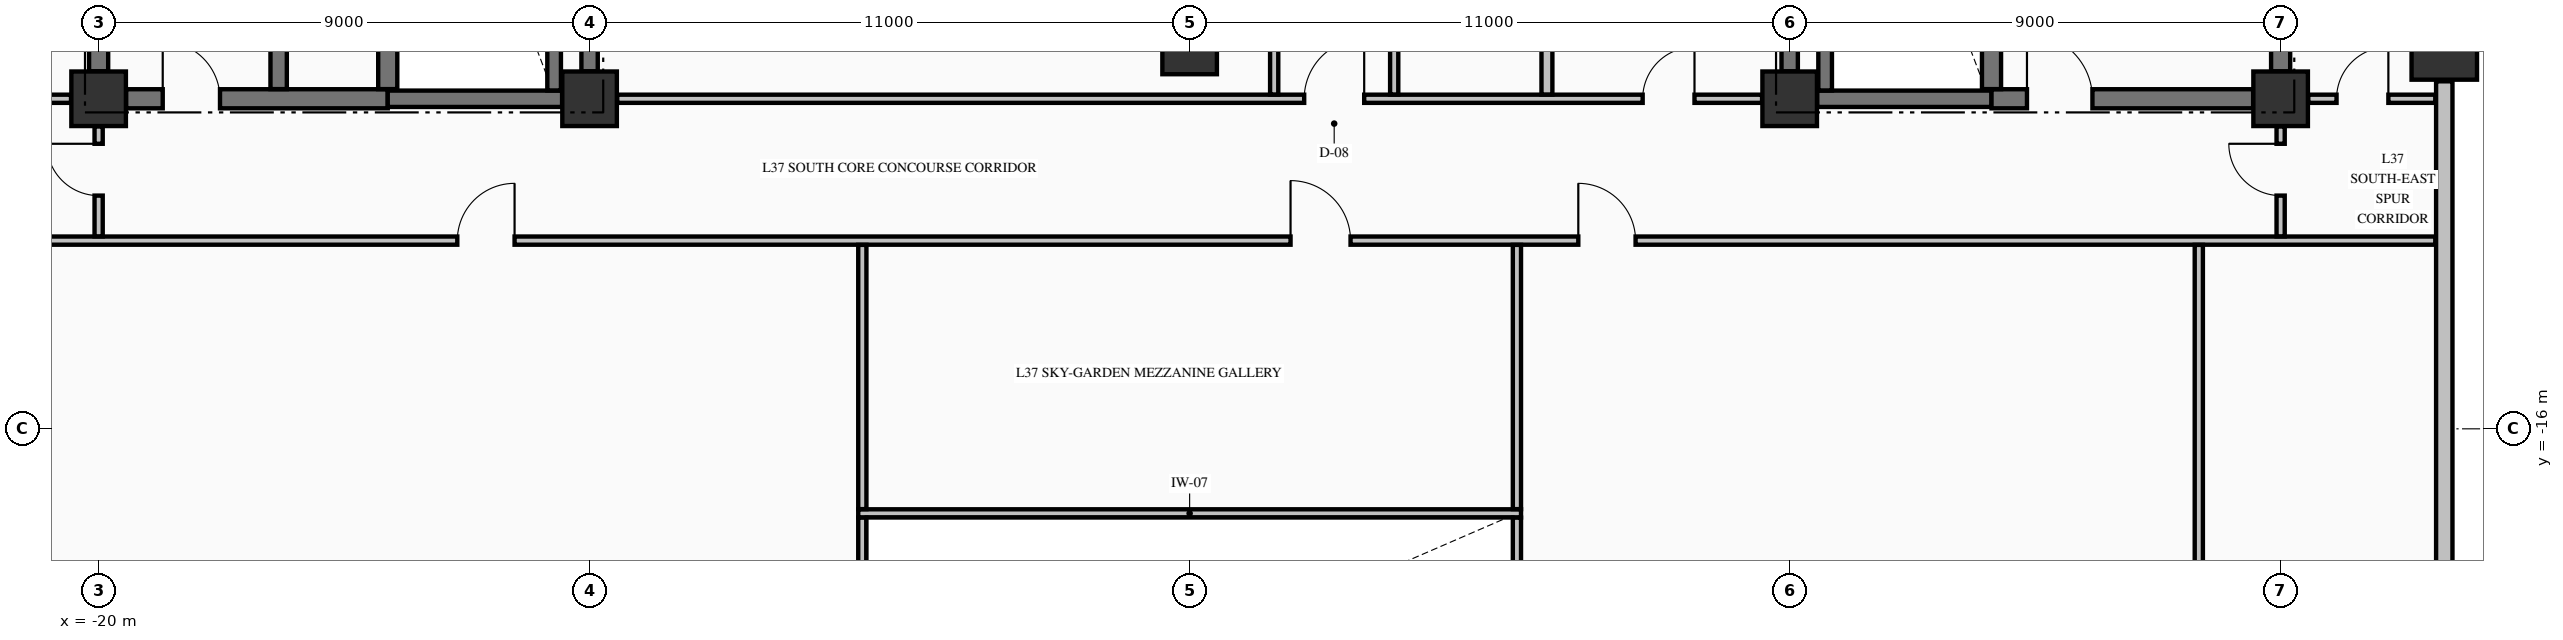
"""IFC4 building model, lengths in metres.
Left out: names, types, materials, properties, quantities, classifications, styles, units other than length and angle.
Written with IfcOpenShell. Run it as: python <this file> out.ifc"""

import sys

from ifc_helpers import new_model, si_unit, direction, frame, frame_2d, origin, origin_2d, place, context, subcontext, project, spatial, rectangle, extrude, element, fill, save


model = new_model("IFC4")
c1 = context("Model", 3, precision=1e-05, world=origin(), true_north=direction((0.0, 1.0)))
c2 = subcontext(c1, "Body", "Model", "MODEL_VIEW")
j1 = project(units=[si_unit("LENGTHUNIT", "METRE"), si_unit("PLANEANGLEUNIT", "RADIAN")], contexts=[c1])
p1 = place(None, origin())
s1 = spatial("IfcSite", under=j1, at=p1, CompositionType="ELEMENT")
p2 = place(p1, origin())
s2 = spatial("IfcBuilding", under=s1, at=p2, CompositionType="ELEMENT")
p3 = place(p2, frame((0.0, 0.0, 146.34)))
s3 = spatial("IfcBuildingStorey", under=s2, at=p3, CompositionType="ELEMENT", Elevation=146.34)
p4 = place(p3, frame((23.0, -9.0, -0.25), z_axis=(0.0, 0.0, 1.0), x_axis=(1.0, 0.0, 0.0)))
e1 = element("IfcColumn", 1, at=p4, inside=s3, PredefinedType="COLUMN", context=c2, shape_type="SweptSolid", body=[
    extrude(rectangle(XDim=1.2, YDim=1.2, at=origin_2d()), origin(), (0.0, 0.0, 1.0), 3.57),
])
for number, where, z_axis, x_axis in (
    (2, (-20.0, -9.95, -0.25), (0.0, 0.0, 1.0), (1.0, 0.0, 0.0)),
    (3, (-11.0, -9.95, -0.25), (0.0, 0.0, 1.0), (1.0, 0.0, 0.0)),
    (4, (11.0, -9.95, -0.25), (0.0, 0.0, 1.0), (1.0, 0.0, 0.0)),
    (5, (20.0, -9.95, -0.25), (0.0, 0.0, 1.0), (1.0, 0.0, 0.0)),
    (6, (0.0, -9.0, -0.25), (0.0, 0.0, 1.0), (1.0, 0.0, 0.0)),
):
    element("IfcColumn", number, at=place(p3, frame(where, z_axis=z_axis, x_axis=x_axis)), inside=s3, PredefinedType="COLUMN", context=c2, shape_type="SweptSolid", body=[
        extrude(rectangle(XDim=1.0, YDim=1.0, at=origin_2d()), origin(), (0.0, 0.0, 1.0), 3.57),
    ])
p5 = place(p3, frame((23.0, -20.37, 0.0), z_axis=(0.0, 0.0, 1.0), x_axis=(0.0, 1.0, 0.0)))
e7 = element("IfcWall", 7, at=p5, inside=s3, PredefinedType="STANDARD", context=c2, shape_type="SweptSolid", body=[
    extrude(rectangle(XDim=10.74, YDim=0.3, at=frame_2d((5.37, 0.0))), origin(), (0.0, 0.0, 1.0), 2.712),
])
p6 = place(p3, frame((-19.496, -9.95, 0.0), z_axis=(0.0, 0.0, 1.0), x_axis=(1.0, 0.0, 0.0)))
e8 = element("IfcWall", 8, at=p6, inside=s3, PredefinedType="SHEAR", context=c2, shape_type="SweptSolid", body=[
    extrude(rectangle(XDim=4.796, YDim=0.35, at=frame_2d((2.398, 0.0))), origin(), (0.0, 0.0, 1.0), 3.32),
])
p7 = place(p6, frame((0.671, 0.0, 0.0)))
e9 = element("IfcOpeningElement", 9, at=p7, cuts=e8, PredefinedType="OPENING", context=c2, shape_type="SweptSolid", body=[
    extrude(rectangle(XDim=1.05, YDim=2.15, at=frame_2d((0.525, 1.075))), frame((0.0, 0.185, 0.0), z_axis=(0.0, -1.0, 0.0), x_axis=(1.0, 0.0, 0.0)), (0.0, 0.0, 1.0), 0.37),
])
for number, where, z_axis, x_axis in (
    (10, (-14.7, -9.95, 0.0), (0.0, 0.0, 1.0), (1.0, 0.0, 0.0)),
    (11, (11.504, -9.95, 0.0), (0.0, 0.0, 1.0), (1.0, 0.0, 0.0)),
):
    element("IfcWall", number, at=place(p3, frame(where, z_axis=z_axis, x_axis=x_axis)), inside=s3, PredefinedType="SHEAR", context=c2, shape_type="SweptSolid", body=[
        extrude(rectangle(XDim=3.196, YDim=0.3, at=frame_2d((1.598, 0.0))), origin(), (0.0, 0.0, 1.0), 3.32),
    ])
p8 = place(p3, frame((14.7, -9.95, 0.0), z_axis=(0.0, 0.0, 1.0), x_axis=(1.0, 0.0, 0.0)))
e12 = element("IfcWall", 12, at=p8, inside=s3, PredefinedType="SHEAR", context=c2, shape_type="SweptSolid", body=[
    extrude(rectangle(XDim=4.796, YDim=0.35, at=frame_2d((2.398, 0.0))), origin(), (0.0, 0.0, 1.0), 3.32),
])
p9 = place(p8, frame((0.65, 0.0, 0.0)))
e13 = element("IfcOpeningElement", 13, at=p9, cuts=e12, PredefinedType="OPENING", context=c2, shape_type="SweptSolid", body=[
    extrude(rectangle(XDim=1.2, YDim=2.15, at=frame_2d((0.6, 1.075))), frame((0.0, 0.185, 0.0), z_axis=(0.0, -1.0, 0.0), x_axis=(1.0, 0.0, 0.0)), (0.0, 0.0, 1.0), 0.37),
])
p10 = place(p3, frame((-6.075, -17.55, 0.0), z_axis=(0.0, 0.0, 1.0), x_axis=(1.0, 0.0, 0.0)))
e14 = element("IfcWall", 14, at=p10, inside=s3, PredefinedType="PARTITIONING", context=c2, shape_type="SweptSolid", body=[
    extrude(rectangle(XDim=12.15, YDim=0.15, at=frame_2d((6.075, 0.0))), origin(), (0.0, 0.0, 1.0), 3.32),
])
p11 = place(p3, frame((-27.835, -12.55, 0.0), z_axis=(0.0, 0.0, 1.0), x_axis=(1.0, 0.0, 0.0)))
e15 = element("IfcWall", 15, at=p11, inside=s3, PredefinedType="PARTITIONING", context=c2, shape_type="SweptSolid", body=[
    extrude(rectangle(XDim=50.67, YDim=0.15, at=frame_2d((25.335, 0.0))), origin(), (0.0, 0.0, 1.0), 3.32),
])
p12 = place(p11, frame((29.685, 0.0, 0.0)))
e16 = element("IfcOpeningElement", 16, at=p12, cuts=e15, PredefinedType="OPENING", context=c2, shape_type="SweptSolid", body=[
    extrude(rectangle(XDim=1.1, YDim=2.15, at=frame_2d((0.55, 1.075))), frame((0.0, 0.085, 0.0), z_axis=(0.0, -1.0, 0.0), x_axis=(1.0, 0.0, 0.0)), (0.0, 0.0, 1.0), 0.17),
])
p13 = place(p11, frame((14.41, 0.0, 0.0)))
e17 = element("IfcOpeningElement", 17, at=p13, cuts=e15, PredefinedType="OPENING", context=c2, shape_type="SweptSolid", body=[
    extrude(rectangle(XDim=1.05, YDim=2.15, at=frame_2d((0.525, 1.075))), frame((0.0, 0.085, 0.0), z_axis=(0.0, -1.0, 0.0), x_axis=(1.0, 0.0, 0.0)), (0.0, 0.0, 1.0), 0.17),
])
p14 = place(p11, frame((34.96, 0.0, 0.0)))
e18 = element("IfcOpeningElement", 18, at=p14, cuts=e15, PredefinedType="OPENING", context=c2, shape_type="SweptSolid", body=[
    extrude(rectangle(XDim=1.05, YDim=2.15, at=frame_2d((0.525, 1.075))), frame((0.0, 0.085, 0.0), z_axis=(0.0, -1.0, 0.0), x_axis=(1.0, 0.0, 0.0)), (0.0, 0.0, 1.0), 0.17),
])
p15 = place(p3, frame((-27.835, -9.95, 0.0), z_axis=(0.0, 0.0, 1.0), x_axis=(1.0, 0.0, 0.0)))
e19 = element("IfcWall", 19, at=p15, inside=s3, PredefinedType="PARTITIONING", context=c2, shape_type="SweptSolid", body=[
    extrude(rectangle(XDim=7.329, YDim=0.15, at=frame_2d((3.665, 0.0))), origin(), (0.0, 0.0, 1.0), 3.32),
])
p16 = place(p15, frame((3.335, 0.0, 0.0)))
e20 = element("IfcOpeningElement", 20, at=p16, cuts=e19, PredefinedType="OPENING", context=c2, shape_type="SweptSolid", body=[
    extrude(rectangle(XDim=1.0, YDim=2.15, at=frame_2d((0.5, 1.075))), frame((0.0, 0.085, 0.0), z_axis=(0.0, -1.0, 0.0), x_axis=(1.0, 0.0, 0.0)), (0.0, 0.0, 1.0), 0.17),
])
p17 = place(p3, frame((-10.494, -9.95, 0.0), z_axis=(0.0, 0.0, 1.0), x_axis=(1.0, 0.0, 0.0)))
e21 = element("IfcWall", 21, at=p17, inside=s3, PredefinedType="PARTITIONING", context=c2, shape_type="SweptSolid", body=[
    extrude(rectangle(XDim=20.988, YDim=0.15, at=frame_2d((10.494, 0.0))), origin(), (0.0, 0.0, 1.0), 3.32),
])
p18 = place(p17, frame((12.594, 0.0, 0.0)))
e22 = element("IfcOpeningElement", 22, at=p18, cuts=e21, PredefinedType="OPENING", context=c2, shape_type="SweptSolid", body=[
    extrude(rectangle(XDim=1.1, YDim=2.15, at=frame_2d((0.55, 1.075))), frame((0.0, 0.085, 0.0), z_axis=(0.0, -1.0, 0.0), x_axis=(1.0, 0.0, 0.0)), (0.0, 0.0, 1.0), 0.17),
])
p19 = place(p17, frame((18.799, 0.0, 0.0)))
e23 = element("IfcOpeningElement", 23, at=p19, cuts=e21, PredefinedType="OPENING", context=c2, shape_type="SweptSolid", body=[
    extrude(rectangle(XDim=0.95, YDim=2.15, at=frame_2d((0.475, 1.075))), frame((0.0, 0.085, 0.0), z_axis=(0.0, -1.0, 0.0), x_axis=(1.0, 0.0, 0.0)), (0.0, 0.0, 1.0), 0.17),
])
p20 = place(p3, frame((20.506, -9.95, 0.0), z_axis=(0.0, 0.0, 1.0), x_axis=(1.0, 0.0, 0.0)))
e24 = element("IfcWall", 24, at=p20, inside=s3, PredefinedType="PARTITIONING", context=c2, shape_type="SweptSolid", body=[
    extrude(rectangle(XDim=2.329, YDim=0.15, at=frame_2d((1.165, 0.0))), origin(), (0.0, 0.0, 1.0), 3.32),
])
p21 = place(p20, frame((0.519, 0.0, 0.0)))
e25 = element("IfcOpeningElement", 25, at=p21, cuts=e24, PredefinedType="OPENING", context=c2, shape_type="SweptSolid", body=[
    extrude(rectangle(XDim=0.95, YDim=2.15, at=frame_2d((0.475, 1.075))), frame((0.0, 0.085, 0.0), z_axis=(0.0, -1.0, 0.0), x_axis=(1.0, 0.0, 0.0)), (0.0, 0.0, 1.0), 0.17),
])
p22 = place(p3, frame((-20.0, -9.446, 0.0), z_axis=(0.0, 0.0, 1.0), x_axis=(0.0, 1.0, 0.0)))
e26 = element("IfcWall", 26, at=p22, inside=s3, PredefinedType="SHEAR", context=c2, shape_type="SweptSolid", body=[
    extrude(rectangle(XDim=8.942, YDim=0.35, at=frame_2d((4.471, 0.0))), origin(), (0.0, 0.0, 1.0), 3.32),
])
p23 = place(p3, frame((-16.7, -9.773, 0.0), z_axis=(0.0, 0.0, 1.0), x_axis=(0.0, 1.0, 0.0)))
e27 = element("IfcWall", 27, at=p23, inside=s3, PredefinedType="SHEAR", context=c2, shape_type="SweptSolid", body=[
    extrude(rectangle(XDim=9.371, YDim=0.3, at=frame_2d((4.686, 0.0))), origin(), (0.0, 0.0, 1.0), 3.32),
])
p24 = place(p3, frame((-14.7, -9.773, 0.0), z_axis=(0.0, 0.0, 1.0), x_axis=(0.0, 1.0, 0.0)))
e28 = element("IfcWall", 28, at=p24, inside=s3, PredefinedType="SHEAR", context=c2, shape_type="SweptSolid", body=[
    extrude(rectangle(XDim=9.371, YDim=0.35, at=frame_2d((4.686, 0.0))), origin(), (0.0, 0.0, 1.0), 3.32),
])
p25 = place(p3, frame((-11.65, -9.798, 0.0), z_axis=(0.0, 0.0, 1.0), x_axis=(0.0, 1.0, 0.0)))
e29 = element("IfcWall", 29, at=p25, inside=s3, PredefinedType="SOLIDWALL", context=c2, shape_type="SweptSolid", body=[
    extrude(rectangle(XDim=9.396, YDim=0.25, at=frame_2d((4.698, 0.0))), origin(), (0.0, 0.0, 1.0), 3.32),
])
for number, where, z_axis, x_axis in (
    (30, (-11.0, -9.446, 0.0), (0.0, 0.0, 1.0), (0.0, 1.0, 0.0)),
    (31, (11.0, -9.446, 0.0), (0.0, 0.0, 1.0), (0.0, 1.0, 0.0)),
):
    element("IfcWall", number, at=place(p3, frame(where, z_axis=z_axis, x_axis=x_axis)), inside=s3, PredefinedType="SHEAR", context=c2, shape_type="SweptSolid", body=[
        extrude(rectangle(XDim=8.942, YDim=0.3, at=frame_2d((4.471, 0.0))), origin(), (0.0, 0.0, 1.0), 3.32),
    ])
p26 = place(p3, frame((11.65, -9.798, 0.0), z_axis=(0.0, 0.0, 1.0), x_axis=(0.0, 1.0, 0.0)))
e32 = element("IfcWall", 32, at=p26, inside=s3, PredefinedType="SOLIDWALL", context=c2, shape_type="SweptSolid", body=[
    extrude(rectangle(XDim=9.396, YDim=0.25, at=frame_2d((4.698, 0.0))), origin(), (0.0, 0.0, 1.0), 3.32),
])
p27 = place(p3, frame((14.7, -9.773, 0.0), z_axis=(0.0, 0.0, 1.0), x_axis=(0.0, 1.0, 0.0)))
e33 = element("IfcWall", 33, at=p27, inside=s3, PredefinedType="SHEAR", context=c2, shape_type="SweptSolid", body=[
    extrude(rectangle(XDim=9.371, YDim=0.35, at=frame_2d((4.686, 0.0))), origin(), (0.0, 0.0, 1.0), 3.32),
])
p28 = place(p3, frame((20.0, -9.446, 0.0), z_axis=(0.0, 0.0, 1.0), x_axis=(0.0, 1.0, 0.0)))
e34 = element("IfcWall", 34, at=p28, inside=s3, PredefinedType="SHEAR", context=c2, shape_type="SweptSolid", body=[
    extrude(rectangle(XDim=2.269, YDim=0.35, at=frame_2d((1.135, 0.0))), origin(), (0.0, 0.0, 1.0), 3.32),
])
p29 = place(p3, frame((-20.0, -12.472, 0.0), z_axis=(0.0, 0.0, 1.0), x_axis=(0.0, 1.0, 0.0)))
e35 = element("IfcWall", 35, at=p29, inside=s3, PredefinedType="PARTITIONING", context=c2, shape_type="SweptSolid", body=[
    extrude(rectangle(XDim=2.016, YDim=0.15, at=frame_2d((1.008, 0.0))), origin(), (0.0, 0.0, 1.0), 2.81),
])
p30 = place(p29, frame((0.747, 0.0, 0.0)))
e36 = element("IfcOpeningElement", 36, at=p30, cuts=e35, PredefinedType="OPENING", context=c2, shape_type="SweptSolid", body=[
    extrude(rectangle(XDim=0.95, YDim=2.15, at=frame_2d((0.475, 1.075))), frame((0.0, 0.085, 0.0), z_axis=(0.0, -1.0, 0.0), x_axis=(1.0, 0.0, 0.0)), (0.0, 0.0, 1.0), 0.17),
])
p31 = place(p3, frame((-6.0, -22.672, 0.0), z_axis=(0.0, 0.0, 1.0), x_axis=(0.0, 1.0, 0.0)))
e37 = element("IfcWall", 37, at=p31, inside=s3, PredefinedType="PARTITIONING", context=c2, shape_type="SweptSolid", body=[
    extrude(rectangle(XDim=5.044, YDim=0.15, at=frame_2d((2.522, 0.0))), origin(), (0.0, 0.0, 1.0), 3.32),
])
p32 = place(p3, frame((-6.0, -17.472, 0.0), z_axis=(0.0, 0.0, 1.0), x_axis=(0.0, 1.0, 0.0)))
e38 = element("IfcWall", 38, at=p32, inside=s3, PredefinedType="PARTITIONING", context=c2, shape_type="SweptSolid", body=[
    extrude(rectangle(XDim=4.844, YDim=0.15, at=frame_2d((2.422, 0.0))), origin(), (0.0, 0.0, 1.0), 3.32),
])
p33 = place(p3, frame((1.55, -9.872, 0.0), z_axis=(0.0, 0.0, 1.0), x_axis=(0.0, 1.0, 0.0)))
e39 = element("IfcWall", 39, at=p33, inside=s3, PredefinedType="PARTITIONING", context=c2, shape_type="SweptSolid", body=[
    extrude(rectangle(XDim=9.544, YDim=0.15, at=frame_2d((4.772, 0.0))), origin(), (0.0, 0.0, 1.0), 3.32),
])
p34 = place(p3, frame((3.75, -9.872, 0.0), z_axis=(0.0, 0.0, 1.0), x_axis=(0.0, 1.0, 0.0)))
e40 = element("IfcWall", 40, at=p34, inside=s3, PredefinedType="PARTITIONING", context=c2, shape_type="SweptSolid", body=[
    extrude(rectangle(XDim=5.519, YDim=0.15, at=frame_2d((2.76, 0.0))), origin(), (0.0, 0.0, 1.0), 3.32),
])
p35 = place(p34, frame((1.997, 0.0, 0.0)))
e41 = element("IfcOpeningElement", 41, at=p35, cuts=e40, PredefinedType="OPENING", context=c2, shape_type="SweptSolid", body=[
    extrude(rectangle(XDim=0.95, YDim=2.15, at=frame_2d((0.475, 1.075))), frame((0.0, 0.085, 0.0), z_axis=(0.0, -1.0, 0.0), x_axis=(1.0, 0.0, 0.0)), (0.0, 0.0, 1.0), 0.17),
])
p36 = place(p3, frame((6.0, -22.672, 0.0), z_axis=(0.0, 0.0, 1.0), x_axis=(0.0, 1.0, 0.0)))
e42 = element("IfcWall", 42, at=p36, inside=s3, PredefinedType="PARTITIONING", context=c2, shape_type="SweptSolid", body=[
    extrude(rectangle(XDim=5.044, YDim=0.15, at=frame_2d((2.522, 0.0))), origin(), (0.0, 0.0, 1.0), 3.32),
])
p37 = place(p3, frame((6.0, -17.472, 0.0), z_axis=(0.0, 0.0, 1.0), x_axis=(0.0, 1.0, 0.0)))
e43 = element("IfcWall", 43, at=p37, inside=s3, PredefinedType="PARTITIONING", context=c2, shape_type="SweptSolid", body=[
    extrude(rectangle(XDim=4.844, YDim=0.15, at=frame_2d((2.422, 0.0))), origin(), (0.0, 0.0, 1.0), 3.32),
])
p38 = place(p3, frame((6.55, -9.872, 0.0), z_axis=(0.0, 0.0, 1.0), x_axis=(0.0, 1.0, 0.0)))
e44 = element("IfcWall", 44, at=p38, inside=s3, PredefinedType="PARTITIONING", context=c2, shape_type="SweptSolid", body=[
    extrude(rectangle(XDim=5.519, YDim=0.2, at=frame_2d((2.76, 0.0))), origin(), (0.0, 0.0, 1.0), 3.32),
])
p39 = place(p3, frame((18.5, -20.394, 0.0), z_axis=(0.0, 0.0, 1.0), x_axis=(0.0, 1.0, 0.0)))
e45 = element("IfcWall", 45, at=p39, inside=s3, PredefinedType="PARTITIONING", context=c2, shape_type="SweptSolid", body=[
    extrude(rectangle(XDim=7.766, YDim=0.15, at=frame_2d((3.883, 0.0))), origin(), (0.0, 0.0, 1.0), 3.32),
])
p40 = place(p3, frame((20.0, -12.472, 0.0), z_axis=(0.0, 0.0, 1.0), x_axis=(0.0, 1.0, 0.0)))
e46 = element("IfcWall", 46, at=p40, inside=s3, PredefinedType="PARTITIONING", context=c2, shape_type="SweptSolid", body=[
    extrude(rectangle(XDim=2.016, YDim=0.15, at=frame_2d((1.008, 0.0))), origin(), (0.0, 0.0, 1.0), 2.81),
])
p41 = place(p40, frame((0.747, 0.0, 0.0)))
e47 = element("IfcOpeningElement", 47, at=p41, cuts=e46, PredefinedType="OPENING", context=c2, shape_type="SweptSolid", body=[
    extrude(rectangle(XDim=0.95, YDim=2.15, at=frame_2d((0.475, 1.075))), frame((0.0, 0.085, 0.0), z_axis=(0.0, -1.0, 0.0), x_axis=(1.0, 0.0, 0.0)), (0.0, 0.0, 1.0), 0.17),
])
p42 = place(p7, origin())
e48 = element("IfcDoor", 48, at=p42, inside=s3, OperationType="SINGLE_SWING_LEFT", PredefinedType="DOOR", context=c2, shape_type="SweptSolid", body=[
    extrude(rectangle(XDim=1.05, YDim=2.15, at=frame_2d((0.525, 1.075))), frame((0.0, 0.025, 0.0), z_axis=(0.0, -1.0, 0.0), x_axis=(1.0, 0.0, 0.0)), (0.0, 0.0, 1.0), 0.05),
])
fill(e9, e48)
p43 = place(p9, origin())
e49 = element("IfcDoor", 49, at=p43, inside=s3, OperationType="SINGLE_SWING_LEFT", PredefinedType="DOOR", context=c2, shape_type="SweptSolid", body=[
    extrude(rectangle(XDim=1.2, YDim=2.15, at=frame_2d((0.6, 1.075))), frame((0.0, 0.025, 0.0), z_axis=(0.0, -1.0, 0.0), x_axis=(1.0, 0.0, 0.0)), (0.0, 0.0, 1.0), 0.05),
])
fill(e13, e49)
p44 = place(p18, origin())
e50 = element("IfcDoor", 50, at=p44, inside=s3, OperationType="SINGLE_SWING_RIGHT", PredefinedType="DOOR", context=c2, shape_type="SweptSolid", body=[
    extrude(rectangle(XDim=1.1, YDim=2.15, at=frame_2d((0.55, 1.075))), frame((0.0, 0.025, 0.0), z_axis=(0.0, -1.0, 0.0), x_axis=(1.0, 0.0, 0.0)), (0.0, 0.0, 1.0), 0.05),
])
fill(e22, e50)
p45 = place(p12, origin())
e51 = element("IfcDoor", 51, at=p45, inside=s3, OperationType="SINGLE_SWING_LEFT", PredefinedType="DOOR", context=c2, shape_type="SweptSolid", body=[
    extrude(rectangle(XDim=1.1, YDim=2.15, at=frame_2d((0.55, 1.075))), frame((0.0, 0.025, 0.0), z_axis=(0.0, -1.0, 0.0), x_axis=(1.0, 0.0, 0.0)), (0.0, 0.0, 1.0), 0.05),
])
fill(e16, e51)
p46 = place(p13, origin())
e52 = element("IfcDoor", 52, at=p46, inside=s3, OperationType="SINGLE_SWING_RIGHT", PredefinedType="DOOR", context=c2, shape_type="SweptSolid", body=[
    extrude(rectangle(XDim=1.05, YDim=2.15, at=frame_2d((0.525, 1.075))), frame((0.0, 0.025, 0.0), z_axis=(0.0, -1.0, 0.0), x_axis=(1.0, 0.0, 0.0)), (0.0, 0.0, 1.0), 0.05),
])
fill(e17, e52)
p47 = place(p14, origin())
e53 = element("IfcDoor", 53, at=p47, inside=s3, OperationType="SINGLE_SWING_LEFT", PredefinedType="DOOR", context=c2, shape_type="SweptSolid", body=[
    extrude(rectangle(XDim=1.05, YDim=2.15, at=frame_2d((0.525, 1.075))), frame((0.0, 0.025, 0.0), z_axis=(0.0, -1.0, 0.0), x_axis=(1.0, 0.0, 0.0)), (0.0, 0.0, 1.0), 0.05),
])
fill(e18, e53)
p48 = place(p19, origin())
e54 = element("IfcDoor", 54, at=p48, inside=s3, OperationType="SINGLE_SWING_RIGHT", PredefinedType="DOOR", context=c2, shape_type="SweptSolid", body=[
    extrude(rectangle(XDim=0.95, YDim=2.15, at=frame_2d((0.475, 1.075))), frame((0.0, 0.025, 0.0), z_axis=(0.0, -1.0, 0.0), x_axis=(1.0, 0.0, 0.0)), (0.0, 0.0, 1.0), 0.05),
])
fill(e23, e54)
p49 = place(p30, origin())
e55 = element("IfcDoor", 55, at=p49, inside=s3, OperationType="SINGLE_SWING_RIGHT", PredefinedType="DOOR", context=c2, shape_type="SweptSolid", body=[
    extrude(rectangle(XDim=0.95, YDim=2.15, at=frame_2d((0.475, 1.075))), frame((0.0, 0.025, 0.0), z_axis=(0.0, -1.0, 0.0), x_axis=(1.0, 0.0, 0.0)), (0.0, 0.0, 1.0), 0.05),
])
fill(e36, e55)
p50 = place(p41, origin())
e56 = element("IfcDoor", 56, at=p50, inside=s3, OperationType="SINGLE_SWING_RIGHT", PredefinedType="DOOR", context=c2, shape_type="SweptSolid", body=[
    extrude(rectangle(XDim=0.95, YDim=2.15, at=frame_2d((0.475, 1.075))), frame((0.0, 0.025, 0.0), z_axis=(0.0, -1.0, 0.0), x_axis=(1.0, 0.0, 0.0)), (0.0, 0.0, 1.0), 0.05),
])
fill(e47, e56)
p51 = place(p21, origin())
e57 = element("IfcDoor", 57, at=p51, inside=s3, OperationType="SINGLE_SWING_RIGHT", PredefinedType="DOOR", context=c2, shape_type="SweptSolid", body=[
    extrude(rectangle(XDim=0.95, YDim=2.15, at=frame_2d((0.475, 1.075))), frame((0.0, 0.025, 0.0), z_axis=(0.0, -1.0, 0.0), x_axis=(1.0, 0.0, 0.0)), (0.0, 0.0, 1.0), 0.05),
])
fill(e25, e57)
save(model, sys.argv[1])
